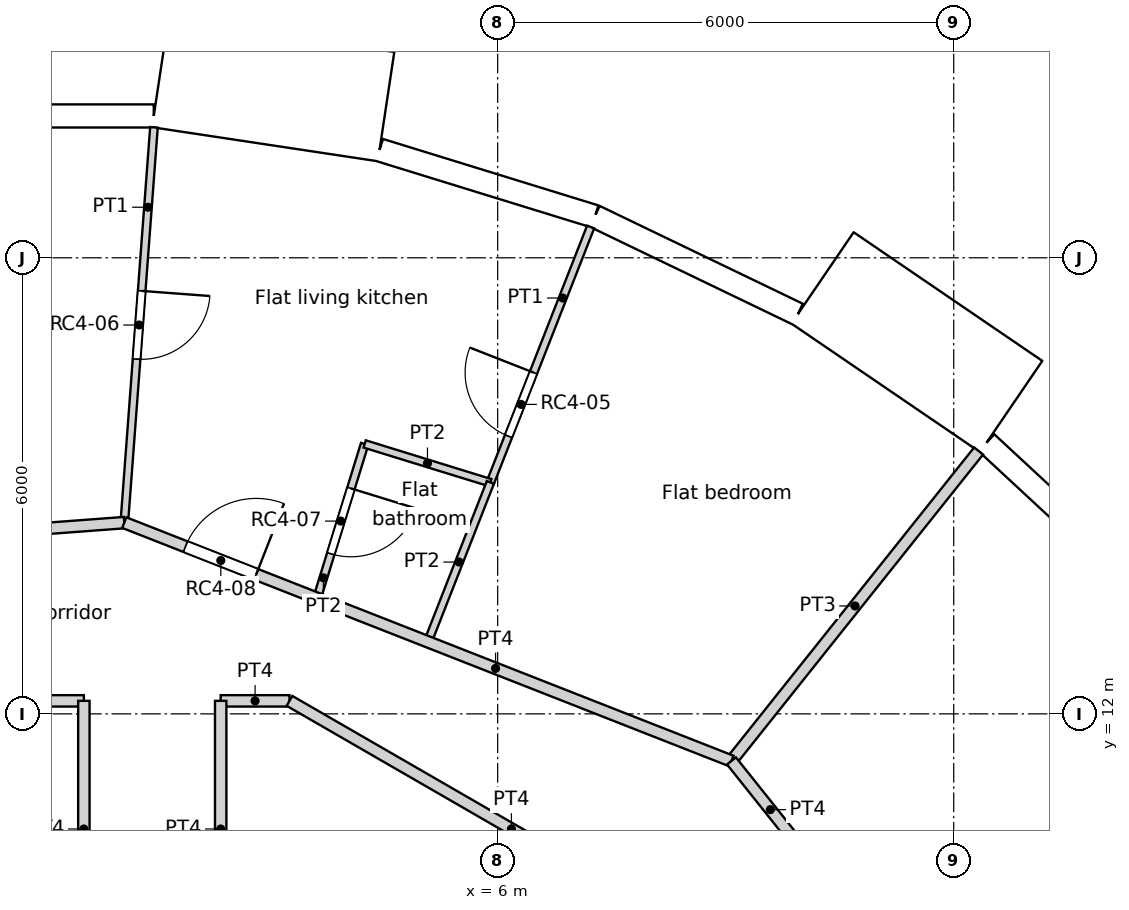
"""IFC4 building model, lengths in metres.
Left out: names, types, materials, properties, quantities, classifications, styles, units other than length and angle.
Written with IfcOpenShell. Run it as: python <this file> out.ifc"""

import sys

from ifc_helpers import new_model, si_unit, direction, frame, frame_2d, origin, origin_2d, place, context, subcontext, project, spatial, rectangle, circle, extrude, element, fill, save


model = new_model("IFC4")
c1 = context("Model", 3, precision=1e-05, world=origin(), true_north=direction((0.0, 1.0)))
c2 = subcontext(c1, "Body", "Model", "MODEL_VIEW")
j1 = project(units=[si_unit("LENGTHUNIT", "METRE"), si_unit("PLANEANGLEUNIT", "RADIAN")], contexts=[c1])
p1 = place(None, origin())
s1 = spatial("IfcSite", under=j1, at=p1, CompositionType="ELEMENT")
p2 = place(p1, origin())
s2 = spatial("IfcBuilding", under=s1, at=p2, CompositionType="ELEMENT")
p3 = place(p2, frame((0.0, 0.0, 263.4)))
s3 = spatial("IfcBuildingStorey", under=s2, at=p3, CompositionType="ELEMENT", Elevation=263.4)
for number, where, z_axis, x_axis in (
    (1, (11.735, 14.716, 0.0), (0.0, 0.0, 1.0), (1.0, 0.0, 0.0)),
    (2, (6.876, 17.521, 0.0), (0.0, 0.0, 1.0), (1.0, 0.0, 0.0)),
    (3, (1.406, 18.77, 0.0), (0.0, 0.0, 1.0), (1.0, 0.0, 0.0)),
):
    element("IfcColumn", number, at=place(p3, frame(where, z_axis=z_axis, x_axis=x_axis)), inside=s3, PredefinedType="COLUMN", context=c2, shape_type="SweptSolid", body=[
        extrude(circle(Radius=0.55, at=origin_2d()), origin(), (0.0, 0.0, 1.0), 3.6),
    ])
p4 = place(p3, frame((14.604, 13.55, 0.0), z_axis=(0.0, 0.0, 1.0), x_axis=(-0.733066412643, 0.680157066165, 0.0)))
e4 = element("IfcWall", 4, at=p4, inside=s3, PredefinedType="SOLIDWALL", context=c2, shape_type="SweptSolid", body=[
    extrude(rectangle(XDim=2.962, YDim=0.3, at=frame_2d((1.481, 0.0))), origin(), (0.0, 0.0, 1.0), 3.25),
])
p5 = place(p4, frame((1.481, 0.0, 1.55)))
e5 = element("IfcOpeningElement", 5, at=p5, cuts=e4, PredefinedType="OPENING", context=c2, shape_type="SweptSolid", body=[
    extrude(circle(Radius=0.9, at=origin_2d()), frame((0.0, 0.16, 0.0), z_axis=(0.0, -1.0, 0.0), x_axis=(1.0, 0.0, 0.0)), (0.0, 0.0, 1.0), 0.32),
])
p6 = place(p3, frame((12.754, 16.044, -0.35), z_axis=(0.0, 0.0, 1.0), x_axis=(-0.826246281157, 0.563309047392, 0.0)))
e6 = element("IfcWall", 6, at=p6, inside=s3, PredefinedType="ELEMENTEDWALL", context=c2, shape_type="SweptSolid", body=[
    extrude(rectangle(XDim=3.0, YDim=1.45, at=frame_2d((1.5, 0.0))), origin(), (0.0, 0.0, 1.0), 3.6),
])
p7 = place(p6, frame((1.5, 0.0, 1.9)))
e7 = element("IfcOpeningElement", 7, at=p7, cuts=e6, PredefinedType="OPENING", context=c2, shape_type="SweptSolid", body=[
    extrude(circle(Radius=0.9, at=origin_2d()), frame((0.0, 0.735, 0.0), z_axis=(0.0, -1.0, 0.0), x_axis=(1.0, 0.0, 0.0)), (0.0, 0.0, 1.0), 1.47),
])
p8 = place(p3, frame((9.947, 17.259, 0.0), z_axis=(0.0, 0.0, 1.0), x_axis=(-0.900939615635, 0.433944476838, 0.0)))
e8 = element("IfcWall", 8, at=p8, inside=s3, PredefinedType="SOLIDWALL", context=c2, shape_type="SweptSolid", body=[
    extrude(rectangle(XDim=2.962, YDim=0.3, at=frame_2d((1.481, 0.0))), origin(), (0.0, 0.0, 1.0), 3.25),
])
p9 = place(p8, frame((1.481, 0.0, 1.55)))
e9 = element("IfcOpeningElement", 9, at=p9, cuts=e8, PredefinedType="OPENING", context=c2, shape_type="SweptSolid", body=[
    extrude(circle(Radius=0.9, at=origin_2d()), frame((0.0, 0.16, 0.0), z_axis=(0.0, -1.0, 0.0), x_axis=(1.0, 0.0, 0.0)), (0.0, 0.0, 1.0), 0.32),
])
p10 = place(p3, frame((7.278, 18.545, 0.0), z_axis=(0.0, 0.0, 1.0), x_axis=(-0.95558635705, 0.294711238707, 0.0)))
e10 = element("IfcWall", 10, at=p10, inside=s3, PredefinedType="SOLIDWALL", context=c2, shape_type="SweptSolid", body=[
    extrude(rectangle(XDim=2.962, YDim=0.3, at=frame_2d((1.481, 0.0))), origin(), (0.0, 0.0, 1.0), 3.25),
])
p11 = place(p10, frame((1.481, 0.0, 1.55)))
e11 = element("IfcOpeningElement", 11, at=p11, cuts=e10, PredefinedType="OPENING", context=c2, shape_type="SweptSolid", body=[
    extrude(circle(Radius=0.9, at=origin_2d()), frame((0.0, 0.16, 0.0), z_axis=(0.0, -1.0, 0.0), x_axis=(1.0, 0.0, 0.0)), (0.0, 0.0, 1.0), 0.32),
])
p12 = place(p3, frame((4.53, 19.989, -0.35), z_axis=(0.0, 0.0, 1.0), x_axis=(-0.988836445254, 0.149004981587, 0.0)))
e12 = element("IfcWall", 12, at=p12, inside=s3, PredefinedType="ELEMENTEDWALL", context=c2, shape_type="SweptSolid", body=[
    extrude(rectangle(XDim=3.0, YDim=1.45, at=frame_2d((1.5, 0.0))), origin(), (0.0, 0.0, 1.0), 3.6),
])
p13 = place(p12, frame((1.5, 0.0, 1.9)))
e13 = element("IfcOpeningElement", 13, at=p13, cuts=e12, PredefinedType="OPENING", context=c2, shape_type="SweptSolid", body=[
    extrude(circle(Radius=0.9, at=origin_2d()), frame((0.0, 0.735, 0.0), z_axis=(0.0, -1.0, 0.0), x_axis=(1.0, 0.0, 0.0)), (0.0, 0.0, 1.0), 1.47),
])
p14 = place(p3, frame((1.473, 19.866, 0.0), z_axis=(0.0, 0.0, 1.0), x_axis=(-1.0, 0.0, 0.0)))
e14 = element("IfcWall", 14, at=p14, inside=s3, PredefinedType="SOLIDWALL", context=c2, shape_type="SweptSolid", body=[
    extrude(rectangle(XDim=2.962, YDim=0.3, at=frame_2d((1.481, 0.0))), origin(), (0.0, 0.0, 1.0), 3.25),
])
p15 = place(p14, frame((1.481, 0.0, 1.55)))
e15 = element("IfcOpeningElement", 15, at=p15, cuts=e14, PredefinedType="OPENING", context=c2, shape_type="SweptSolid", body=[
    extrude(circle(Radius=0.9, at=origin_2d()), frame((0.0, 0.16, 0.0), z_axis=(0.0, -1.0, 0.0), x_axis=(1.0, 0.0, 0.0)), (0.0, 0.0, 1.0), 0.32),
])
p16 = place(p3, frame((0.556, 8.8, 0.0), z_axis=(0.0, 0.0, 1.0), x_axis=(0.0, 1.0, 0.0)))
e16 = element("IfcWall", 16, at=p16, inside=s3, PredefinedType="PARTITIONING", context=c2, shape_type="SweptSolid", body=[
    extrude(rectangle(XDim=3.371, YDim=0.15, at=frame_2d((1.686, 0.0))), origin(), (0.0, 0.0, 1.0), 3.25),
])
p17 = place(p3, frame((-3.261, 12.171, 0.0), z_axis=(0.0, 0.0, 1.0), x_axis=(1.0, 0.0, 0.0)))
e17 = element("IfcWall", 17, at=p17, inside=s3, PredefinedType="PARTITIONING", context=c2, shape_type="SweptSolid", body=[
    extrude(rectangle(XDim=3.817, YDim=0.15, at=frame_2d((1.908, 0.0))), origin(), (0.0, 0.0, 1.0), 3.25),
])
p18 = place(p3, frame((3.261, 12.171, 0.0), z_axis=(0.0, 0.0, 1.0), x_axis=(0.866066809554, -0.499928276245, 0.0)))
e18 = element("IfcWall", 18, at=p18, inside=s3, PredefinedType="PARTITIONING", context=c2, shape_type="SweptSolid", body=[
    extrude(rectangle(XDim=6.743, YDim=0.15, at=frame_2d((3.371, 0.0))), origin(), (0.0, 0.0, 1.0), 3.25),
])
p19 = place(p3, frame((2.356, 12.171, 0.0), z_axis=(0.0, 0.0, 1.0), x_axis=(1.0, 0.0, 0.0)))
e19 = element("IfcWall", 19, at=p19, inside=s3, PredefinedType="PARTITIONING", context=c2, shape_type="SweptSolid", body=[
    extrude(rectangle(XDim=0.905, YDim=0.15, at=frame_2d((0.453, 0.0))), origin(), (0.0, 0.0, 1.0), 3.25),
])
p20 = place(p3, frame((2.356, 8.8, 0.0), z_axis=(0.0, 0.0, 1.0), x_axis=(0.0, 1.0, 0.0)))
e20 = element("IfcWall", 20, at=p20, inside=s3, PredefinedType="PARTITIONING", context=c2, shape_type="SweptSolid", body=[
    extrude(rectangle(XDim=3.371, YDim=0.15, at=frame_2d((1.686, 0.0))), origin(), (0.0, 0.0, 1.0), 3.25),
])
p21 = place(p3, frame((9.076, 11.381, 0.0), z_axis=(0.0, 0.0, 1.0), x_axis=(0.623805208652, -0.781579849829, 0.0)))
e21 = element("IfcWall", 21, at=p21, inside=s3, PredefinedType="PARTITIONING", context=c2, shape_type="SweptSolid", body=[
    extrude(rectangle(XDim=1.64, YDim=0.15, at=frame_2d((0.82, 0.0))), origin(), (0.0, 0.0, 1.0), 3.25),
])
p22 = place(p3, frame((1.088, 14.516, 0.0), z_axis=(0.0, 0.0, 1.0), x_axis=(0.930800934608, -0.365526497168, 0.0)))
e22 = element("IfcWall", 22, at=p22, inside=s3, PredefinedType="PARTITIONING", context=c2, shape_type="SweptSolid", body=[
    extrude(rectangle(XDim=8.581, YDim=0.15, at=frame_2d((4.291, 0.0))), origin(), (0.0, 0.0, 1.0), 3.25),
])
p23 = place(p22, frame((0.864, 0.0, 0.0)))
e23 = element("IfcOpeningElement", 23, at=p23, cuts=e22, PredefinedType="OPENING", context=c2, shape_type="SweptSolid", body=[
    extrude(rectangle(XDim=1.0, YDim=2.1, at=frame_2d((0.5, 1.05))), frame((0.0, 0.075, 0.0), z_axis=(0.0, -1.0, 0.0), x_axis=(1.0, 0.0, 0.0)), (0.0, 0.0, 1.0), 0.15),
])
p24 = place(p3, frame((-3.239, 14.192, 0.0), z_axis=(0.0, 0.0, 1.0), x_axis=(0.997204448067, 0.074721407608, 0.0)))
e24 = element("IfcWall", 24, at=p24, inside=s3, PredefinedType="PARTITIONING", context=c2, shape_type="SweptSolid", body=[
    extrude(rectangle(XDim=4.339, YDim=0.15, at=frame_2d((2.169, 0.0))), origin(), (0.0, 0.0, 1.0), 3.25),
])
p25 = place(p3, frame((9.076, 11.381, 0.0), z_axis=(0.0, 0.0, 1.0), x_axis=(0.623460949534, 0.781854490558, 0.0)))
e25 = element("IfcWall", 25, at=p25, inside=s3, PredefinedType="PARTITIONING", context=c2, shape_type="SweptSolid", body=[
    extrude(rectangle(XDim=5.214, YDim=0.15, at=frame_2d((2.607, 0.0))), origin(), (0.0, 0.0, 1.0), 3.25),
])
p26 = place(p3, frame((5.903, 15.041, 0.0), z_axis=(0.0, 0.0, 1.0), x_axis=(0.36523219083, 0.930916455318, 0.0)))
e26 = element("IfcWall", 26, at=p26, inside=s3, PredefinedType="PARTITIONING", context=c2, shape_type="SweptSolid", body=[
    extrude(rectangle(XDim=3.614, YDim=0.1, at=frame_2d((1.807, 0.0))), origin(), (0.0, 0.0, 1.0), 3.25),
])
p27 = place(p26, frame((0.657, 0.0, 0.0)))
e27 = element("IfcOpeningElement", 27, at=p27, cuts=e26, PredefinedType="OPENING", context=c2, shape_type="SweptSolid", body=[
    extrude(rectangle(XDim=0.9, YDim=2.1, at=frame_2d((0.45, 1.05))), frame((0.0, 0.05, 0.0), z_axis=(0.0, -1.0, 0.0), x_axis=(1.0, 0.0, 0.0)), (0.0, 0.0, 1.0), 0.1),
])
p28 = place(p3, frame((1.088, 14.516, 0.0), z_axis=(0.0, 0.0, 1.0), x_axis=(0.074816718541, 0.997197301755, 0.0)))
e28 = element("IfcWall", 28, at=p28, inside=s3, PredefinedType="PARTITIONING", context=c2, shape_type="SweptSolid", body=[
    extrude(rectangle(XDim=5.215, YDim=0.1, at=frame_2d((2.607, 0.0))), origin(), (0.0, 0.0, 1.0), 3.25),
])
p29 = place(p28, frame((2.157, 0.0, 0.0)))
e29 = element("IfcOpeningElement", 29, at=p29, cuts=e28, PredefinedType="OPENING", context=c2, shape_type="SweptSolid", body=[
    extrude(rectangle(XDim=0.9, YDim=2.1, at=frame_2d((0.45, 1.05))), frame((0.0, 0.05, 0.0), z_axis=(0.0, -1.0, 0.0), x_axis=(1.0, 0.0, 0.0)), (0.0, 0.0, 1.0), 0.1),
])
p30 = place(p3, frame((4.25, 15.551, 0.0), z_axis=(0.0, 0.0, 1.0), x_axis=(0.955555986234, -0.294809696536, 0.0)))
e30 = element("IfcWall", 30, at=p30, inside=s3, PredefinedType="PARTITIONING", context=c2, shape_type="SweptSolid", body=[
    extrude(rectangle(XDim=1.73, YDim=0.1, at=frame_2d((0.865, 0.0))), origin(), (0.0, 0.0, 1.0), 3.25),
])
p31 = place(p3, frame((3.624, 13.521, 0.0), z_axis=(0.0, 0.0, 1.0), x_axis=(0.294667251911, 0.955599921856, 0.0)))
e31 = element("IfcWall", 31, at=p31, inside=s3, PredefinedType="PARTITIONING", context=c2, shape_type="SweptSolid", body=[
    extrude(rectangle(XDim=2.124, YDim=0.1, at=frame_2d((1.062, 0.0))), origin(), (0.0, 0.0, 1.0), 3.25),
])
p32 = place(p31, frame((0.612, 0.0, 0.0)))
e32 = element("IfcOpeningElement", 32, at=p32, cuts=e31, PredefinedType="OPENING", context=c2, shape_type="SweptSolid", body=[
    extrude(rectangle(XDim=0.9, YDim=2.0, at=frame_2d((0.45, 1.0))), frame((0.0, 0.05, 0.0), z_axis=(0.0, -1.0, 0.0), x_axis=(1.0, 0.0, 0.0)), (0.0, 0.0, 1.0), 0.1),
])
p33 = place(p3, frame((5.082, 12.949, 0.0), z_axis=(0.0, 0.0, 1.0), x_axis=(0.365118857447, 0.930960912142, 0.0)))
e33 = element("IfcWall", 33, at=p33, inside=s3, PredefinedType="PARTITIONING", context=c2, shape_type="SweptSolid", body=[
    extrude(rectangle(XDim=2.251, YDim=0.1, at=frame_2d((1.126, 0.0))), origin(), (0.0, 0.0, 1.0), 3.25),
])
p34 = place(p5, origin())
e34 = element("IfcWindow", 34, at=p34, inside=s3, PartitioningType="SINGLE_PANEL", PredefinedType="WINDOW", context=c2, shape_type="SweptSolid", body=[
    extrude(circle(Radius=0.9, at=origin_2d()), frame((0.0, 0.12, 0.0), z_axis=(0.0, -1.0, 0.0), x_axis=(1.0, 0.0, 0.0)), (0.0, 0.0, 1.0), 0.1),
])
fill(e5, e34)
p35 = place(p7, origin())
e35 = element("IfcWindow", 35, at=p35, inside=s3, PartitioningType="SINGLE_PANEL", PredefinedType="WINDOW", context=c2, shape_type="SweptSolid", body=[
    extrude(circle(Radius=0.9, at=origin_2d()), frame((0.0, 0.695, 0.0), z_axis=(0.0, -1.0, 0.0), x_axis=(1.0, 0.0, 0.0)), (0.0, 0.0, 1.0), 0.1),
])
fill(e7, e35)
p36 = place(p9, origin())
e36 = element("IfcWindow", 36, at=p36, inside=s3, PartitioningType="SINGLE_PANEL", PredefinedType="WINDOW", context=c2, shape_type="SweptSolid", body=[
    extrude(circle(Radius=0.9, at=origin_2d()), frame((0.0, 0.12, 0.0), z_axis=(0.0, -1.0, 0.0), x_axis=(1.0, 0.0, 0.0)), (0.0, 0.0, 1.0), 0.1),
])
fill(e9, e36)
p37 = place(p11, origin())
e37 = element("IfcWindow", 37, at=p37, inside=s3, PartitioningType="SINGLE_PANEL", PredefinedType="WINDOW", context=c2, shape_type="SweptSolid", body=[
    extrude(circle(Radius=0.9, at=origin_2d()), frame((0.0, 0.12, 0.0), z_axis=(0.0, -1.0, 0.0), x_axis=(1.0, 0.0, 0.0)), (0.0, 0.0, 1.0), 0.1),
])
fill(e11, e37)
p38 = place(p13, origin())
e38 = element("IfcWindow", 38, at=p38, inside=s3, PartitioningType="SINGLE_PANEL", PredefinedType="WINDOW", context=c2, shape_type="SweptSolid", body=[
    extrude(circle(Radius=0.9, at=origin_2d()), frame((0.0, 0.695, 0.0), z_axis=(0.0, -1.0, 0.0), x_axis=(1.0, 0.0, 0.0)), (0.0, 0.0, 1.0), 0.1),
])
fill(e13, e38)
p39 = place(p15, origin())
e39 = element("IfcWindow", 39, at=p39, inside=s3, PartitioningType="SINGLE_PANEL", PredefinedType="WINDOW", context=c2, shape_type="SweptSolid", body=[
    extrude(circle(Radius=0.9, at=origin_2d()), frame((0.0, 0.12, 0.0), z_axis=(0.0, -1.0, 0.0), x_axis=(1.0, 0.0, 0.0)), (0.0, 0.0, 1.0), 0.1),
])
fill(e15, e39)
p40 = place(p27, origin())
e40 = element("IfcDoor", 40, at=p40, inside=s3, OperationType="SINGLE_SWING_RIGHT", PredefinedType="DOOR", context=c2, shape_type="SweptSolid", body=[
    extrude(rectangle(XDim=0.9, YDim=2.1, at=frame_2d((0.45, 1.05))), frame((0.0, 0.025, 0.0), z_axis=(0.0, -1.0, 0.0), x_axis=(1.0, 0.0, 0.0)), (0.0, 0.0, 1.0), 0.05),
])
fill(e27, e40)
p41 = place(p29, origin())
e41 = element("IfcDoor", 41, at=p41, inside=s3, OperationType="SINGLE_SWING_LEFT", PredefinedType="DOOR", context=c2, shape_type="SweptSolid", body=[
    extrude(rectangle(XDim=0.9, YDim=2.1, at=frame_2d((0.45, 1.05))), frame((0.0, 0.025, 0.0), z_axis=(0.0, -1.0, 0.0), x_axis=(1.0, 0.0, 0.0)), (0.0, 0.0, 1.0), 0.05),
])
fill(e29, e41)
p42 = place(p32, origin())
e42 = element("IfcDoor", 42, at=p42, inside=s3, OperationType="SINGLE_SWING_LEFT", PredefinedType="DOOR", context=c2, shape_type="SweptSolid", body=[
    extrude(rectangle(XDim=0.9, YDim=2.0, at=frame_2d((0.45, 1.0))), frame((0.0, 0.025, 0.0), z_axis=(0.0, -1.0, 0.0), x_axis=(1.0, 0.0, 0.0)), (0.0, 0.0, 1.0), 0.05),
])
fill(e32, e42)
p43 = place(p23, origin())
e43 = element("IfcDoor", 43, at=p43, inside=s3, OperationType="SINGLE_SWING_RIGHT", PredefinedType="DOOR", context=c2, shape_type="SweptSolid", body=[
    extrude(rectangle(XDim=1.0, YDim=2.1, at=frame_2d((0.5, 1.05))), frame((0.0, 0.025, 0.0), z_axis=(0.0, -1.0, 0.0), x_axis=(1.0, 0.0, 0.0)), (0.0, 0.0, 1.0), 0.05),
])
fill(e23, e43)
save(model, sys.argv[1])
